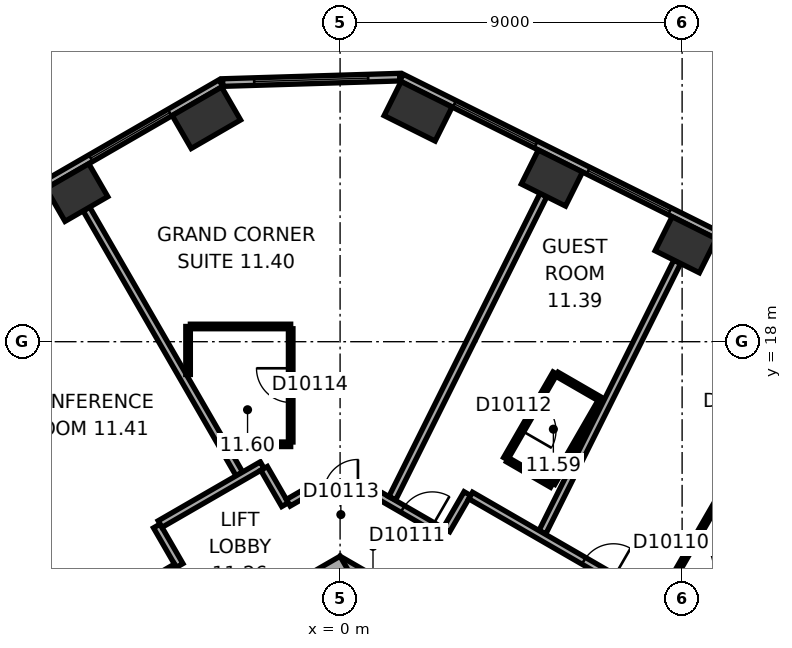
"""IFC4 building model, lengths in metres.
Left out: names, types, materials, properties, quantities, classifications, styles, units other than length and angle.
Written with IfcOpenShell. Run it as: python <this file> out.ifc"""

import sys

from ifc_helpers import new_model, si_unit, direction, frame, frame_2d, origin, origin_2d, place, context, subcontext, project, spatial, rectangle, extrude, element, fill, save


model = new_model("IFC4")
c1 = context("Model", 3, precision=1e-05, world=origin(), true_north=direction((0.0, 1.0)))
c2 = subcontext(c1, "Body", "Model", "MODEL_VIEW")
j1 = project(units=[si_unit("LENGTHUNIT", "METRE"), si_unit("PLANEANGLEUNIT", "RADIAN")], contexts=[c1])
p1 = place(None, origin())
s1 = spatial("IfcSite", under=j1, at=p1, CompositionType="ELEMENT")
p2 = place(p1, origin())
s2 = spatial("IfcBuilding", under=s1, at=p2, CompositionType="ELEMENT")
p3 = place(p2, frame((0.0, 0.0, 57.2)))
s3 = spatial("IfcBuildingStorey", under=s2, at=p3, CompositionType="ELEMENT", Elevation=57.2)
for number, where, z_axis, x_axis in (
    (1, (9.095, 20.551, 0.0), (0.0, 0.0, 1.0), (-0.895, 0.446, 0.0)),
    (2, (5.574, 22.306, 0.0), (0.0, 0.0, 1.0), (-0.895, 0.446, 0.0)),
):
    element("IfcColumn", number, at=place(p3, frame(where, z_axis=z_axis, x_axis=x_axis)), inside=s3, PredefinedType="COLUMN", context=c2, shape_type="SweptSolid", body=[
        extrude(rectangle(XDim=1.3, YDim=1.0, at=origin_2d()), origin(), (0.0, 0.0, 1.0), 3.3),
    ])
for number, where, z_axis, x_axis in (
    (3, (2.053, 24.062, 0.0), (0.0, 0.0, 1.0), (-0.895, 0.446, 0.0)),
    (4, (-3.518, 23.892, 0.0), (0.0, 0.0, 1.0), (-0.866, -0.5, 0.0)),
):
    element("IfcColumn", number, at=place(p3, frame(where, z_axis=z_axis, x_axis=x_axis)), inside=s3, PredefinedType="COLUMN", context=c2, shape_type="SweptSolid", body=[
        extrude(rectangle(XDim=1.5, YDim=1.0, at=origin_2d()), origin(), (0.0, 0.0, 1.0), 3.3),
    ])
p4 = place(p3, frame((-6.926, 21.925, 0.0), z_axis=(0.0, 0.0, 1.0), x_axis=(-0.866025403784, -0.5, 0.0)))
e5 = element("IfcColumn", 5, at=p4, inside=s3, PredefinedType="COLUMN", context=c2, shape_type="SweptSolid", body=[
    extrude(rectangle(XDim=1.3, YDim=1.0, at=origin_2d()), origin(), (0.0, 0.0, 1.0), 3.3),
])
p5 = place(p3, frame((10.4, 5.658, 0.0), z_axis=(0.0, 0.0, 1.0), x_axis=(-0.866021384402, 0.500006961711, 0.0)))
e6 = element("IfcWall", 6, at=p5, inside=s3, PredefinedType="SHEAR", context=c2, shape_type="SweptSolid", body=[
    extrude(rectangle(XDim=12.355, YDim=1.2, at=frame_2d((6.178, 0.0))), origin(), (0.0, 0.0, 1.0), 3.3),
])
p6 = place(p5, frame((2.728, 0.0, 0.0)))
e7 = element("IfcOpeningElement", 7, at=p6, cuts=e6, PredefinedType="OPENING", context=c2, shape_type="SweptSolid", body=[
    extrude(rectangle(XDim=1.1, YDim=2.1, at=frame_2d((0.55, 1.05))), frame((0.0, 0.61, 0.0), z_axis=(0.0, -1.0, 0.0), x_axis=(1.0, 0.0, 0.0)), (0.0, 0.0, 1.0), 1.22),
])
p7 = place(p5, frame((5.328, 0.0, 0.0)))
e8 = element("IfcOpeningElement", 8, at=p7, cuts=e6, PredefinedType="OPENING", context=c2, shape_type="SweptSolid", body=[
    extrude(rectangle(XDim=1.1, YDim=2.1, at=frame_2d((0.55, 1.05))), frame((0.0, 0.61, 0.0), z_axis=(0.0, -1.0, 0.0), x_axis=(1.0, 0.0, 0.0)), (0.0, 0.0, 1.0), 1.22),
])
p8 = place(p5, frame((7.928, 0.0, 0.0)))
e9 = element("IfcOpeningElement", 9, at=p8, cuts=e6, PredefinedType="OPENING", context=c2, shape_type="SweptSolid", body=[
    extrude(rectangle(XDim=1.1, YDim=2.1, at=frame_2d((0.55, 1.05))), frame((0.0, 0.61, 0.0), z_axis=(0.0, -1.0, 0.0), x_axis=(1.0, 0.0, 0.0)), (0.0, 0.0, 1.0), 1.22),
])
p9 = place(p3, frame((0.3, 11.836, 0.0), z_axis=(0.0, 0.0, 1.0), x_axis=(-0.866021384402, -0.500006961711, 0.0)))
e10 = element("IfcWall", 10, at=p9, inside=s3, PredefinedType="SHEAR", context=c2, shape_type="SweptSolid", body=[
    extrude(rectangle(XDim=12.355, YDim=1.2, at=frame_2d((6.178, 0.0))), origin(), (0.0, 0.0, 1.0), 3.3),
])
p10 = place(p9, frame((6.378, 0.0, 0.0)))
e11 = element("IfcOpeningElement", 11, at=p10, cuts=e10, PredefinedType="OPENING", context=c2, shape_type="SweptSolid", body=[
    extrude(rectangle(XDim=1.5, YDim=2.1, at=frame_2d((0.75, 1.05))), frame((0.0, 0.61, 0.0), z_axis=(0.0, -1.0, 0.0), x_axis=(1.0, 0.0, 0.0)), (0.0, 0.0, 1.0), 1.22),
])
p11 = place(p9, frame((1.828, 0.0, 0.0)))
e12 = element("IfcOpeningElement", 12, at=p11, cuts=e10, PredefinedType="OPENING", context=c2, shape_type="SweptSolid", body=[
    extrude(rectangle(XDim=1.1, YDim=2.1, at=frame_2d((0.55, 1.05))), frame((0.0, 0.61, 0.0), z_axis=(0.0, -1.0, 0.0), x_axis=(1.0, 0.0, 0.0)), (0.0, 0.0, 1.0), 1.22),
])
p12 = place(p3, frame((20.63, 15.47, 0.0), z_axis=(0.0, 0.0, 1.0), x_axis=(-0.894934518609, 0.446197498203, 0.0)))
e13 = element("IfcWall", 13, at=p12, inside=s3, PredefinedType="STANDARD", context=c2, shape_type="SweptSolid", body=[
    extrude(rectangle(XDim=21.246, YDim=0.2, at=frame_2d((10.623, 0.0))), origin(), (0.0, 0.0, 1.0), 3.3),
])
p13 = place(p12, frame((1.553, 0.0, 0.8)))
e14 = element("IfcOpeningElement", 14, at=p13, cuts=e13, PredefinedType="OPENING", context=c2, shape_type="SweptSolid", body=[
    extrude(rectangle(XDim=2.4, YDim=1.7, at=frame_2d((1.2, 0.85))), frame((0.0, 0.11, 0.0), z_axis=(0.0, -1.0, 0.0), x_axis=(1.0, 0.0, 0.0)), (0.0, 0.0, 1.0), 0.22),
])
p14 = place(p12, frame((5.488, 0.0, 0.8)))
e15 = element("IfcOpeningElement", 15, at=p14, cuts=e13, PredefinedType="OPENING", context=c2, shape_type="SweptSolid", body=[
    extrude(rectangle(XDim=2.4, YDim=1.7, at=frame_2d((1.2, 0.85))), frame((0.0, 0.11, 0.0), z_axis=(0.0, -1.0, 0.0), x_axis=(1.0, 0.0, 0.0)), (0.0, 0.0, 1.0), 0.22),
])
p15 = place(p12, frame((9.422, 0.0, 0.8)))
e16 = element("IfcOpeningElement", 16, at=p15, cuts=e13, PredefinedType="OPENING", context=c2, shape_type="SweptSolid", body=[
    extrude(rectangle(XDim=2.4, YDim=1.7, at=frame_2d((1.2, 0.85))), frame((0.0, 0.11, 0.0), z_axis=(0.0, -1.0, 0.0), x_axis=(1.0, 0.0, 0.0)), (0.0, 0.0, 1.0), 0.22),
])
p16 = place(p12, frame((13.357, 0.0, 0.8)))
e17 = element("IfcOpeningElement", 17, at=p16, cuts=e13, PredefinedType="OPENING", context=c2, shape_type="SweptSolid", body=[
    extrude(rectangle(XDim=2.4, YDim=1.7, at=frame_2d((1.2, 0.85))), frame((0.0, 0.11, 0.0), z_axis=(0.0, -1.0, 0.0), x_axis=(1.0, 0.0, 0.0)), (0.0, 0.0, 1.0), 0.22),
])
p17 = place(p12, frame((17.292, 0.0, 0.8)))
e18 = element("IfcOpeningElement", 18, at=p17, cuts=e13, PredefinedType="OPENING", context=c2, shape_type="SweptSolid", body=[
    extrude(rectangle(XDim=2.4, YDim=1.7, at=frame_2d((1.2, 0.85))), frame((0.0, 0.11, 0.0), z_axis=(0.0, -1.0, 0.0), x_axis=(1.0, 0.0, 0.0)), (0.0, 0.0, 1.0), 0.22),
])
p18 = place(p3, frame((1.568, 24.961, 0.0), z_axis=(0.0, 0.0, 1.0), x_axis=(-0.999533359013, -0.030546099927, 0.0)))
e19 = element("IfcWall", 19, at=p18, inside=s3, PredefinedType="STANDARD", context=c2, shape_type="SweptSolid", body=[
    extrude(rectangle(XDim=4.66, YDim=0.2, at=frame_2d((2.33, 0.0))), origin(), (0.0, 0.0, 1.0), 3.3),
])
p19 = place(p18, frame((0.83, 0.0, 0.8)))
e20 = element("IfcOpeningElement", 20, at=p19, cuts=e19, PredefinedType="OPENING", context=c2, shape_type="SweptSolid", body=[
    extrude(rectangle(XDim=3.0, YDim=1.7, at=frame_2d((1.5, 0.85))), frame((0.0, 0.11, 0.0), z_axis=(0.0, -1.0, 0.0), x_axis=(1.0, 0.0, 0.0)), (0.0, 0.0, 1.0), 0.22),
])
p20 = place(p3, frame((-3.136, 24.805, 0.0), z_axis=(0.0, 0.0, 1.0), x_axis=(-0.866028291626, -0.499994998079, 0.0)))
e21 = element("IfcWall", 21, at=p20, inside=s3, PredefinedType="STANDARD", context=c2, shape_type="SweptSolid", body=[
    extrude(rectangle(XDim=21.246, YDim=0.2, at=frame_2d((10.623, 0.0))), origin(), (0.0, 0.0, 1.0), 3.3),
])
p21 = place(p20, frame((1.555, 0.0, 0.8)))
e22 = element("IfcOpeningElement", 22, at=p21, cuts=e21, PredefinedType="OPENING", context=c2, shape_type="SweptSolid", body=[
    extrude(rectangle(XDim=2.4, YDim=1.7, at=frame_2d((1.2, 0.85))), frame((0.0, 0.11, 0.0), z_axis=(0.0, -1.0, 0.0), x_axis=(1.0, 0.0, 0.0)), (0.0, 0.0, 1.0), 0.22),
])
p22 = place(p20, frame((5.489, 0.0, 0.8)))
e23 = element("IfcOpeningElement", 23, at=p22, cuts=e21, PredefinedType="OPENING", context=c2, shape_type="SweptSolid", body=[
    extrude(rectangle(XDim=2.4, YDim=1.7, at=frame_2d((1.2, 0.85))), frame((0.0, 0.11, 0.0), z_axis=(0.0, -1.0, 0.0), x_axis=(1.0, 0.0, 0.0)), (0.0, 0.0, 1.0), 0.22),
])
p23 = place(p20, frame((9.424, 0.0, 0.8)))
e24 = element("IfcOpeningElement", 24, at=p23, cuts=e21, PredefinedType="OPENING", context=c2, shape_type="SweptSolid", body=[
    extrude(rectangle(XDim=2.4, YDim=1.7, at=frame_2d((1.2, 0.85))), frame((0.0, 0.11, 0.0), z_axis=(0.0, -1.0, 0.0), x_axis=(1.0, 0.0, 0.0)), (0.0, 0.0, 1.0), 0.22),
])
p24 = place(p20, frame((13.358, 0.0, 0.8)))
e25 = element("IfcOpeningElement", 25, at=p24, cuts=e21, PredefinedType="OPENING", context=c2, shape_type="SweptSolid", body=[
    extrude(rectangle(XDim=2.4, YDim=1.7, at=frame_2d((1.2, 0.85))), frame((0.0, 0.11, 0.0), z_axis=(0.0, -1.0, 0.0), x_axis=(1.0, 0.0, 0.0)), (0.0, 0.0, 1.0), 0.22),
])
p25 = place(p20, frame((17.293, 0.0, 0.8)))
e26 = element("IfcOpeningElement", 26, at=p25, cuts=e21, PredefinedType="OPENING", context=c2, shape_type="SweptSolid", body=[
    extrude(rectangle(XDim=2.4, YDim=1.7, at=frame_2d((1.2, 0.85))), frame((0.0, 0.11, 0.0), z_axis=(0.0, -1.0, 0.0), x_axis=(1.0, 0.0, 0.0)), (0.0, 0.0, 1.0), 0.22),
])
p26 = place(p3, frame((-6.676, 21.492, 0.0), z_axis=(0.0, 0.0, 1.0), x_axis=(0.500011263043, -0.866018900966, 0.0)))
e27 = element("IfcWall", 27, at=p26, inside=s3, PredefinedType="PARTITIONING", context=c2, shape_type="SweptSolid", body=[
    extrude(rectangle(XDim=8.049, YDim=0.2, at=frame_2d((4.024, 0.0))), origin(), (0.0, 0.0, 1.0), 3.05),
])
p27 = place(p3, frame((-4.823, 13.152, 0.0), z_axis=(0.0, 0.0, 1.0), x_axis=(0.499986357472, -0.866033280158, 0.0)))
e28 = element("IfcWall", 28, at=p27, inside=s3, PredefinedType="PARTITIONING", context=c2, shape_type="SweptSolid", body=[
    extrude(rectangle(XDim=1.201, YDim=0.2, at=frame_2d((0.601, 0.0))), origin(), (0.0, 0.0, 1.0), 3.05),
])
p28 = place(p3, frame((-4.309, 12.061, 0.0), z_axis=(0.0, 0.0, 1.0), x_axis=(-0.866020679205, -0.500008183122, 0.0)))
e29 = element("IfcWall", 29, at=p28, inside=s3, PredefinedType="PARTITIONING", context=c2, shape_type="SweptSolid", body=[
    extrude(rectangle(XDim=5.104, YDim=0.2, at=frame_2d((2.552, 0.0))), origin(), (0.0, 0.0, 1.0), 3.05),
])
p29 = place(p28, frame((2.052, 0.0, 0.0)))
e30 = element("IfcOpeningElement", 30, at=p29, cuts=e29, PredefinedType="OPENING", context=c2, shape_type="SweptSolid", body=[
    extrude(rectangle(XDim=1.0, YDim=2.1, at=frame_2d((0.5, 1.05))), frame((0.0, 0.11, 0.0), z_axis=(0.0, -1.0, 0.0), x_axis=(1.0, 0.0, 0.0)), (0.0, 0.0, 1.0), 0.22),
])
p30 = place(p3, frame((-4.0, 17.137, 0.0), z_axis=(0.0, 0.0, 1.0), x_axis=(0.0, 1.0, 0.0)))
e31 = element("IfcWall", 31, at=p30, inside=s3, PredefinedType="PARTITIONING", context=c2, shape_type="SweptSolid", body=[
    extrude(rectangle(XDim=1.263, YDim=0.12, at=frame_2d((0.632, 0.0))), origin(), (0.0, 0.0, 1.0), 3.05),
])
p31 = place(p3, frame((-3.94, 18.401, 0.0), z_axis=(0.0, 0.0, 1.0), x_axis=(1.0, 0.0, 0.0)))
e32 = element("IfcWall", 32, at=p31, inside=s3, PredefinedType="PARTITIONING", context=c2, shape_type="SweptSolid", body=[
    extrude(rectangle(XDim=2.64, YDim=0.12, at=frame_2d((1.32, 0.0))), origin(), (0.0, 0.0, 1.0), 3.05),
])
p32 = place(p3, frame((-2.05, 14.752, 0.0), z_axis=(0.0, 0.0, 1.0), x_axis=(-0.866030936828, -0.499990416364, 0.0)))
e33 = element("IfcWall", 33, at=p32, inside=s3, PredefinedType="PARTITIONING", context=c2, shape_type="SweptSolid", body=[
    extrude(rectangle(XDim=3.102, YDim=0.2, at=frame_2d((1.551, 0.0))), origin(), (0.0, 0.0, 1.0), 3.05),
])
p33 = place(p3, frame((-1.449, 13.712, 0.0), z_axis=(0.0, 0.0, 1.0), x_axis=(-0.499978356969, 0.866037899034, 0.0)))
e34 = element("IfcWall", 34, at=p33, inside=s3, PredefinedType="PARTITIONING", context=c2, shape_type="SweptSolid", body=[
    extrude(rectangle(XDim=1.101, YDim=0.2, at=frame_2d((0.551, 0.0))), origin(), (0.0, 0.0, 1.0), 3.05),
])
p34 = place(p3, frame((-1.3, 15.301, 0.0), z_axis=(0.0, 0.0, 1.0), x_axis=(-1.0, 0.0, 0.0)))
e35 = element("IfcWall", 35, at=p34, inside=s3, PredefinedType="PARTITIONING", context=c2, shape_type="SweptSolid", body=[
    extrude(rectangle(XDim=1.661, YDim=0.12, at=frame_2d((0.831, 0.0))), origin(), (0.0, 0.0, 1.0), 3.05),
])
p35 = place(p3, frame((-1.3, 18.341, 0.0), z_axis=(0.0, 0.0, 1.0), x_axis=(0.0, -1.0, 0.0)))
e36 = element("IfcWall", 36, at=p35, inside=s3, PredefinedType="PARTITIONING", context=c2, shape_type="SweptSolid", body=[
    extrude(rectangle(XDim=2.98, YDim=0.12, at=frame_2d((1.49, 0.0))), origin(), (0.0, 0.0, 1.0), 3.05),
])
p36 = place(p35, frame((1.04, 0.0, 0.0)))
e37 = element("IfcOpeningElement", 37, at=p36, cuts=e36, PredefinedType="OPENING", context=c2, shape_type="SweptSolid", body=[
    extrude(rectangle(XDim=0.9, YDim=2.1, at=frame_2d((0.45, 1.05))), frame((0.0, 0.07, 0.0), z_axis=(0.0, -1.0, 0.0), x_axis=(1.0, 0.0, 0.0)), (0.0, 0.0, 1.0), 0.14),
])
p37 = place(p3, frame((-0.95, 14.001, 0.0), z_axis=(0.0, 0.0, 1.0), x_axis=(-0.86609177584, -0.499885022602, 0.0)))
e38 = element("IfcWall", 38, at=p37, inside=s3, PredefinedType="PARTITIONING", context=c2, shape_type="SweptSolid", body=[
    extrude(rectangle(XDim=0.477, YDim=0.2, at=frame_2d((0.238, 0.0))), origin(), (0.0, 0.0, 1.0), 3.05),
])
p38 = place(p3, frame((0.95, 14.001, 0.0), z_axis=(0.0, 0.0, 1.0), x_axis=(-1.0, 0.0, 0.0)))
e39 = element("IfcWall", 39, at=p38, inside=s3, PredefinedType="PARTITIONING", context=c2, shape_type="SweptSolid", body=[
    extrude(rectangle(XDim=1.86, YDim=0.2, at=frame_2d((0.93, 0.0))), origin(), (0.0, 0.0, 1.0), 3.05),
])
p39 = place(p38, frame((0.48, 0.0, 0.0)))
e40 = element("IfcOpeningElement", 40, at=p39, cuts=e39, PredefinedType="OPENING", context=c2, shape_type="SweptSolid", body=[
    extrude(rectangle(XDim=0.9, YDim=2.1, at=frame_2d((0.45, 1.05))), frame((0.0, 0.11, 0.0), z_axis=(0.0, -1.0, 0.0), x_axis=(1.0, 0.0, 0.0)), (0.0, 0.0, 1.0), 0.22),
])
p40 = place(p3, frame((2.748, 12.962, 0.0), z_axis=(0.0, 0.0, 1.0), x_axis=(-0.866013897511, 0.50001992892, 0.0)))
e41 = element("IfcWall", 41, at=p40, inside=s3, PredefinedType="PARTITIONING", context=c2, shape_type="SweptSolid", body=[
    extrude(rectangle(XDim=2.037, YDim=0.2, at=frame_2d((1.018, 0.0))), origin(), (0.0, 0.0, 1.0), 3.05),
])
p41 = place(p40, frame((0.372, 0.0, 0.0)))
e42 = element("IfcOpeningElement", 42, at=p41, cuts=e41, PredefinedType="OPENING", context=c2, shape_type="SweptSolid", body=[
    extrude(rectangle(XDim=0.9, YDim=2.1, at=frame_2d((0.45, 1.05))), frame((0.0, 0.11, 0.0), z_axis=(0.0, -1.0, 0.0), x_axis=(1.0, 0.0, 0.0)), (0.0, 0.0, 1.0), 0.22),
])
p42 = place(p3, frame((3.349, 14.002, 0.0), z_axis=(0.0, 0.0, 1.0), x_axis=(-0.500074377092, -0.865982457891, 0.0)))
e43 = element("IfcWall", 43, at=p42, inside=s3, PredefinedType="PARTITIONING", context=c2, shape_type="SweptSolid", body=[
    extrude(rectangle(XDim=1.101, YDim=0.2, at=frame_2d((0.55, 0.0))), origin(), (0.0, 0.0, 1.0), 3.05),
])
p43 = place(p3, frame((4.356, 14.922, 0.0), z_axis=(0.0, 0.0, 1.0), x_axis=(0.499936506574, 0.866062058628, 0.0)))
e44 = element("IfcWall", 44, at=p43, inside=s3, PredefinedType="PARTITIONING", context=c2, shape_type="SweptSolid", body=[
    extrude(rectangle(XDim=2.6, YDim=0.12, at=frame_2d((1.3, 0.0))), origin(), (0.0, 0.0, 1.0), 3.05),
])
p44 = place(p43, frame((0.85, 0.0, 0.0)))
e45 = element("IfcOpeningElement", 45, at=p44, cuts=e44, PredefinedType="OPENING", context=c2, shape_type="SweptSolid", body=[
    extrude(rectangle(XDim=0.9, YDim=2.1, at=frame_2d((0.45, 1.05))), frame((0.0, 0.07, 0.0), z_axis=(0.0, -1.0, 0.0), x_axis=(1.0, 0.0, 0.0)), (0.0, 0.0, 1.0), 0.14),
])
p45 = place(p3, frame((5.351, 21.859, 0.0), z_axis=(0.0, 0.0, 1.0), x_axis=(-0.446205309328, -0.894930624086, 0.0)))
e46 = element("IfcWall", 46, at=p45, inside=s3, PredefinedType="PARTITIONING", context=c2, shape_type="SweptSolid", body=[
    extrude(rectangle(XDim=8.913, YDim=0.2, at=frame_2d((4.457, 0.0))), origin(), (0.0, 0.0, 1.0), 2.6),
])
p46 = place(p3, frame((5.569, 14.222, 0.0), z_axis=(0.0, 0.0, 1.0), x_axis=(-0.866036909293, 0.499980071345, 0.0)))
e47 = element("IfcWall", 47, at=p46, inside=s3, PredefinedType="PARTITIONING", context=c2, shape_type="SweptSolid", body=[
    extrude(rectangle(XDim=1.34, YDim=0.12, at=frame_2d((0.67, 0.0))), origin(), (0.0, 0.0, 1.0), 3.05),
])
p47 = place(p3, frame((5.708, 17.144, 0.0), z_axis=(0.0, 0.0, 1.0), x_axis=(0.866082447003, -0.499901185229, 0.0)))
e48 = element("IfcWall", 48, at=p47, inside=s3, PredefinedType="PARTITIONING", context=c2, shape_type="SweptSolid", body=[
    extrude(rectangle(XDim=1.34, YDim=0.12, at=frame_2d((0.67, 0.0))), origin(), (0.0, 0.0, 1.0), 3.05),
])
p48 = place(p3, frame((6.839, 16.422, 0.0), z_axis=(0.0, 0.0, 1.0), x_axis=(-0.50000366821, -0.866023285932, 0.0)))
e49 = element("IfcWall", 49, at=p48, inside=s3, PredefinedType="PARTITIONING", context=c2, shape_type="SweptSolid", body=[
    extrude(rectangle(XDim=2.48, YDim=0.12, at=frame_2d((1.24, 0.0))), origin(), (0.0, 0.0, 1.0), 3.05),
])
p49 = place(p3, frame((8.424, 11.188, 0.0), z_axis=(0.0, 0.0, 1.0), x_axis=(0.49995078051, 0.866053818805, 0.0)))
e50 = element("IfcWall", 50, at=p49, inside=s3, PredefinedType="PARTITIONING", context=c2, shape_type="SweptSolid", body=[
    extrude(rectangle(XDim=2.9, YDim=0.12, at=frame_2d((1.45, 0.0))), origin(), (0.0, 0.0, 1.0), 3.05),
])
p50 = place(p49, frame((1.0, 0.0, 0.0)))
e51 = element("IfcOpeningElement", 51, at=p50, cuts=e50, PredefinedType="OPENING", context=c2, shape_type="SweptSolid", body=[
    extrude(rectangle(XDim=0.9, YDim=2.1, at=frame_2d((0.45, 1.05))), frame((0.0, 0.07, 0.0), z_axis=(0.0, -1.0, 0.0), x_axis=(1.0, 0.0, 0.0)), (0.0, 0.0, 1.0), 0.14),
])
p51 = place(p3, frame((8.872, 20.104, 0.0), z_axis=(0.0, 0.0, 1.0), x_axis=(-0.446218378653, -0.894924107706, 0.0)))
e52 = element("IfcWall", 52, at=p51, inside=s3, PredefinedType="PARTITIONING", context=c2, shape_type="SweptSolid", body=[
    extrude(rectangle(XDim=7.95, YDim=0.2, at=frame_2d((3.975, 0.0))), origin(), (0.0, 0.0, 1.0), 3.05),
])
p52 = place(p3, frame((10.972, 9.602, 0.0), z_axis=(0.0, 0.0, 1.0), x_axis=(-0.866033277307, 0.499986362411, 0.0)))
e53 = element("IfcWall", 53, at=p52, inside=s3, PredefinedType="PARTITIONING", context=c2, shape_type="SweptSolid", body=[
    extrude(rectangle(XDim=8.702, YDim=0.2, at=frame_2d((4.351, 0.0))), origin(), (0.0, 0.0, 1.0), 3.05),
])
p53 = place(p52, frame((4.364, 0.0, 0.0)))
e54 = element("IfcOpeningElement", 54, at=p53, cuts=e53, PredefinedType="OPENING", context=c2, shape_type="SweptSolid", body=[
    extrude(rectangle(XDim=0.9, YDim=2.1, at=frame_2d((0.45, 1.05))), frame((0.0, 0.11, 0.0), z_axis=(0.0, -1.0, 0.0), x_axis=(1.0, 0.0, 0.0)), (0.0, 0.0, 1.0), 0.22),
])
p54 = place(p16, origin())
e55 = element("IfcWindow", 55, at=p54, inside=s3, PartitioningType="SINGLE_PANEL", PredefinedType="WINDOW", context=c2, shape_type="SweptSolid", body=[
    extrude(rectangle(XDim=2.4, YDim=1.7, at=frame_2d((1.2, 0.85))), frame((0.0, 0.03, 0.0), z_axis=(0.0, -1.0, 0.0), x_axis=(1.0, 0.0, 0.0)), (0.0, 0.0, 1.0), 0.06),
])
fill(e17, e55)
p55 = place(p17, origin())
e56 = element("IfcWindow", 56, at=p55, inside=s3, PartitioningType="SINGLE_PANEL", PredefinedType="WINDOW", context=c2, shape_type="SweptSolid", body=[
    extrude(rectangle(XDim=2.4, YDim=1.7, at=frame_2d((1.2, 0.85))), frame((0.0, 0.03, 0.0), z_axis=(0.0, -1.0, 0.0), x_axis=(1.0, 0.0, 0.0)), (0.0, 0.0, 1.0), 0.06),
])
fill(e18, e56)
p56 = place(p19, origin())
e57 = element("IfcWindow", 57, at=p56, inside=s3, PartitioningType="SINGLE_PANEL", PredefinedType="WINDOW", context=c2, shape_type="SweptSolid", body=[
    extrude(rectangle(XDim=3.0, YDim=1.7, at=frame_2d((1.5, 0.85))), frame((0.0, 0.03, 0.0), z_axis=(0.0, -1.0, 0.0), x_axis=(1.0, 0.0, 0.0)), (0.0, 0.0, 1.0), 0.06),
])
fill(e20, e57)
p57 = place(p21, origin())
e58 = element("IfcWindow", 58, at=p57, inside=s3, PartitioningType="SINGLE_PANEL", PredefinedType="WINDOW", context=c2, shape_type="SweptSolid", body=[
    extrude(rectangle(XDim=2.4, YDim=1.7, at=frame_2d((1.2, 0.85))), frame((0.0, 0.03, 0.0), z_axis=(0.0, -1.0, 0.0), x_axis=(1.0, 0.0, 0.0)), (0.0, 0.0, 1.0), 0.06),
])
fill(e22, e58)
p58 = place(p53, origin())
e59 = element("IfcDoor", 59, at=p58, inside=s3, OperationType="SINGLE_SWING_LEFT", PredefinedType="DOOR", context=c2, shape_type="SweptSolid", body=[
    extrude(rectangle(XDim=0.9, YDim=2.1, at=frame_2d((0.45, 1.05))), frame((0.0, 0.025, 0.0), z_axis=(0.0, -1.0, 0.0), x_axis=(1.0, 0.0, 0.0)), (0.0, 0.0, 1.0), 0.05),
])
fill(e54, e59)
p59 = place(p50, origin())
e60 = element("IfcDoor", 60, at=p59, inside=s3, OperationType="SINGLE_SWING_LEFT", PredefinedType="DOOR", context=c2, shape_type="SweptSolid", body=[
    extrude(rectangle(XDim=0.9, YDim=2.1, at=frame_2d((0.45, 1.05))), frame((0.0, 0.025, 0.0), z_axis=(0.0, -1.0, 0.0), x_axis=(1.0, 0.0, 0.0)), (0.0, 0.0, 1.0), 0.05),
])
fill(e51, e60)
p60 = place(p41, origin())
e61 = element("IfcDoor", 61, at=p60, inside=s3, OperationType="SINGLE_SWING_LEFT", PredefinedType="DOOR", context=c2, shape_type="SweptSolid", body=[
    extrude(rectangle(XDim=0.9, YDim=2.1, at=frame_2d((0.45, 1.05))), frame((0.0, 0.025, 0.0), z_axis=(0.0, -1.0, 0.0), x_axis=(1.0, 0.0, 0.0)), (0.0, 0.0, 1.0), 0.05),
])
fill(e42, e61)
p61 = place(p44, origin())
e62 = element("IfcDoor", 62, at=p61, inside=s3, OperationType="SINGLE_SWING_LEFT", PredefinedType="DOOR", context=c2, shape_type="SweptSolid", body=[
    extrude(rectangle(XDim=0.9, YDim=2.1, at=frame_2d((0.45, 1.05))), frame((0.0, 0.025, 0.0), z_axis=(0.0, -1.0, 0.0), x_axis=(1.0, 0.0, 0.0)), (0.0, 0.0, 1.0), 0.05),
])
fill(e45, e62)
p62 = place(p39, origin())
e63 = element("IfcDoor", 63, at=p62, inside=s3, OperationType="SINGLE_SWING_LEFT", PredefinedType="DOOR", context=c2, shape_type="SweptSolid", body=[
    extrude(rectangle(XDim=0.9, YDim=2.1, at=frame_2d((0.45, 1.05))), frame((0.0, 0.025, 0.0), z_axis=(0.0, -1.0, 0.0), x_axis=(1.0, 0.0, 0.0)), (0.0, 0.0, 1.0), 0.05),
])
fill(e40, e63)
p63 = place(p36, origin())
e64 = element("IfcDoor", 64, at=p63, inside=s3, OperationType="SINGLE_SWING_LEFT", PredefinedType="DOOR", context=c2, shape_type="SweptSolid", body=[
    extrude(rectangle(XDim=0.9, YDim=2.1, at=frame_2d((0.45, 1.05))), frame((0.0, 0.025, 0.0), z_axis=(0.0, -1.0, 0.0), x_axis=(1.0, 0.0, 0.0)), (0.0, 0.0, 1.0), 0.05),
])
fill(e37, e64)
save(model, sys.argv[1])
